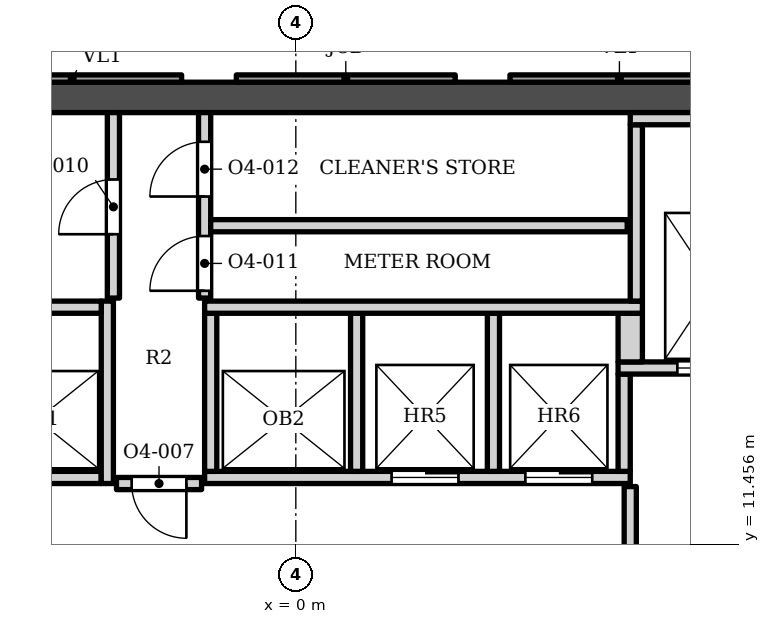
"""IFC4 building model, lengths in metres.
Left out: names, types, materials, properties, quantities, classifications, styles, units other than length and angle.
Written with IfcOpenShell. Run it as: python <this file> out.ifc"""

import sys

from ifc_helpers import new_model, si_unit, direction, frame, frame_2d, origin, place, context, subcontext, project, spatial, polyline, rectangle, outline, extrude, element, fill, save


model = new_model("IFC4")
c1 = context("Model", 3, precision=1e-05, world=origin(), true_north=direction((0.0, 1.0)))
c2 = subcontext(c1, "Body", "Model", "MODEL_VIEW")
j1 = project(units=[si_unit("LENGTHUNIT", "METRE"), si_unit("PLANEANGLEUNIT", "RADIAN")], contexts=[c1])
p1 = place(None, origin())
s1 = spatial("IfcSite", under=j1, at=p1, CompositionType="ELEMENT")
p2 = place(p1, origin())
s2 = spatial("IfcBuilding", under=s1, at=p2, CompositionType="ELEMENT")
p3 = place(p2, frame((0.0, 0.0, 179.7)))
s3 = spatial("IfcBuildingStorey", under=s2, at=p3, CompositionType="ELEMENT", Elevation=179.7)
p4 = place(p3, frame((-15.1, 18.802, 0.0), z_axis=(0.0, 0.0, 1.0), x_axis=(1.0, 0.0, 0.0)))
e1 = element("IfcWall", 1, at=p4, inside=s3, PredefinedType="SHEAR", context=c2, shape_type="SweptSolid", body=[
    extrude(rectangle(XDim=30.2, YDim=0.5, at=frame_2d((15.1, 0.0))), origin(), (0.0, 0.0, 1.0), 3.9),
])
p5 = place(p3, origin())
e2 = element("IfcWall", 2, at=p5, inside=s3, PredefinedType="ELEMENTEDWALL", context=c2, shape_type="SweptSolid", body=[
    extrude(outline(polyline([(3.522, 19.173), (3.522, 19.052), (7.122, 19.052), (7.122, 19.173), (3.522, 19.173)])), origin(), (0.0, 0.0, 1.0), 3.0),
])
p6 = place(p3, origin())
e3 = element("IfcWall", 3, at=p6, inside=s3, PredefinedType="SOLIDWALL", context=c2, shape_type="SweptSolid", body=[
    extrude(outline(polyline([(-0.978, 19.173), (-0.978, 19.052), (2.622, 19.052), (2.622, 19.173), (-0.978, 19.173)])), origin(), (0.0, 0.0, 1.0), 3.0),
])
p7 = place(p3, origin())
e4 = element("IfcWall", 4, at=p7, inside=s3, PredefinedType="ELEMENTEDWALL", context=c2, shape_type="SweptSolid", body=[
    extrude(outline(polyline([(-5.478, 19.173), (-5.478, 19.052), (-1.878, 19.052), (-1.878, 19.173), (-5.478, 19.173)])), origin(), (0.0, 0.0, 1.0), 3.0),
])
p8 = place(p3, frame((5.5, 9.103, 0.0), z_axis=(0.0, 0.0, 1.0), x_axis=(0.0, 1.0, 0.0)))
e5 = element("IfcWall", 5, at=p8, inside=s3, PredefinedType="SOLIDWALL", context=c2, shape_type="SweptSolid", body=[
    extrude(rectangle(XDim=3.3, YDim=0.2, at=frame_2d((1.65, 0.0))), origin(), (0.0, 0.0, 1.0), 3.73),
])
p9 = place(p8, frame((0.85, 0.0, 0.0)))
e6 = element("IfcOpeningElement", 6, at=p9, cuts=e5, PredefinedType="OPENING", context=c2, shape_type="SweptSolid", body=[
    extrude(rectangle(XDim=1.4, YDim=2.1, at=frame_2d((0.7, 1.05))), frame((0.0, 0.11, 0.0), z_axis=(0.0, -1.0, 0.0), x_axis=(1.0, 0.0, 0.0)), (0.0, 0.0, 1.0), 0.22),
])
p10 = place(p3, frame((-2.95, 12.453, 0.0), z_axis=(0.0, 0.0, 1.0), x_axis=(1.0, 0.0, 0.0)))
e7 = element("IfcWall", 7, at=p10, inside=s3, PredefinedType="SOLIDWALL", context=c2, shape_type="SweptSolid", body=[
    extrude(rectangle(XDim=1.4, YDim=0.2, at=frame_2d((0.7, 0.0))), origin(), (0.0, 0.0, 1.0), 3.73),
])
p11 = place(p10, frame((0.25, 0.0, 0.0)))
e8 = element("IfcOpeningElement", 8, at=p11, cuts=e7, PredefinedType="OPENING", context=c2, shape_type="SweptSolid", body=[
    extrude(rectangle(XDim=0.9, YDim=2.1, at=frame_2d((0.45, 1.05))), frame((0.0, 0.11, 0.0), z_axis=(0.0, -1.0, 0.0), x_axis=(1.0, 0.0, 0.0)), (0.0, 0.0, 1.0), 0.22),
])
p12 = place(p3, frame((-5.3, 12.552, 0.0), z_axis=(0.0, 0.0, 1.0), x_axis=(1.0, 0.0, 0.0)))
e9 = element("IfcWall", 9, at=p12, inside=s3, PredefinedType="SOLIDWALL", context=c2, shape_type="SweptSolid", body=[
    extrude(rectangle(XDim=2.1, YDim=0.2, at=frame_2d((1.05, 0.0))), origin(), (0.0, 0.0, 1.0), 3.73),
])
p13 = place(p3, frame((-3.1, 12.453, 0.0), z_axis=(0.0, 0.0, 1.0), x_axis=(0.0, 1.0, 0.0)))
e10 = element("IfcWall", 10, at=p13, inside=s3, PredefinedType="SOLIDWALL", context=c2, shape_type="SweptSolid", body=[
    extrude(rectangle(XDim=3.0, YDim=0.2, at=frame_2d((1.5, 0.0))), origin(), (0.0, 0.0, 1.0), 3.73),
])
p14 = place(p3, frame((-1.5, 12.552, 0.0), z_axis=(0.0, 0.0, 1.0), x_axis=(1.0, 0.0, 0.0)))
e11 = element("IfcWall", 11, at=p14, inside=s3, PredefinedType="SOLIDWALL", context=c2, shape_type="SweptSolid", body=[
    extrude(rectangle(XDim=7.0, YDim=0.2, at=frame_2d((3.5, 0.0))), origin(), (0.0, 0.0, 1.0), 3.73),
])
p15 = place(p14, frame((3.075, 0.0, 0.0)))
e12 = element("IfcOpeningElement", 12, at=p15, cuts=e11, PredefinedType="OPENING", context=c2, shape_type="SweptSolid", body=[
    extrude(rectangle(XDim=1.1, YDim=2.1, at=frame_2d((0.55, 1.05))), frame((0.0, 0.11, 0.0), z_axis=(0.0, -1.0, 0.0), x_axis=(1.0, 0.0, 0.0)), (0.0, 0.0, 1.0), 0.22),
])
p16 = place(p14, frame((5.275, 0.0, 0.0)))
e13 = element("IfcOpeningElement", 13, at=p16, cuts=e11, PredefinedType="OPENING", context=c2, shape_type="SweptSolid", body=[
    extrude(rectangle(XDim=1.1, YDim=2.1, at=frame_2d((0.55, 1.05))), frame((0.0, 0.11, 0.0), z_axis=(0.0, -1.0, 0.0), x_axis=(1.0, 0.0, 0.0)), (0.0, 0.0, 1.0), 0.22),
])
for number, where, z_axis, x_axis in (
    (14, (-1.4, 12.653, 0.0), (0.0, 0.0, 1.0), (0.0, 1.0, 0.0)),
    (15, (1.0, 12.653, 0.0), (0.0, 0.0, 1.0), (0.0, 1.0, 0.0)),
    (16, (3.25, 12.653, 0.0), (0.0, 0.0, 1.0), (0.0, 1.0, 0.0)),
):
    element("IfcWall", number, at=place(p3, frame(where, z_axis=z_axis, x_axis=x_axis)), inside=s3, PredefinedType="SOLIDWALL", context=c2, shape_type="SweptSolid", body=[
        extrude(rectangle(XDim=2.6, YDim=0.2, at=frame_2d((1.3, 0.0))), origin(), (0.0, 0.0, 1.0), 3.73),
    ])
p17 = place(p3, frame((5.4, 12.653, 0.0), z_axis=(0.0, 0.0, 1.0), x_axis=(0.0, 1.0, 0.0)))
e17 = element("IfcWall", 17, at=p17, inside=s3, PredefinedType="SOLIDWALL", context=c2, shape_type="SweptSolid", body=[
    extrude(rectangle(XDim=1.6, YDim=0.2, at=frame_2d((0.8, 0.0))), origin(), (0.0, 0.0, 1.0), 3.73),
])
p18 = place(p3, frame((5.3, 14.353, 0.0), z_axis=(0.0, 0.0, 1.0), x_axis=(1.0, 0.0, 0.0)))
e18 = element("IfcWall", 18, at=p18, inside=s3, PredefinedType="SOLIDWALL", context=c2, shape_type="SweptSolid", body=[
    extrude(rectangle(XDim=2.75, YDim=0.2, at=frame_2d((1.375, 0.0))), origin(), (0.0, 0.0, 1.0), 3.73),
])
p19 = place(p18, frame((0.975, 0.0, 0.0)))
e19 = element("IfcOpeningElement", 19, at=p19, cuts=e18, PredefinedType="OPENING", context=c2, shape_type="SweptSolid", body=[
    extrude(rectangle(XDim=1.2, YDim=2.1, at=frame_2d((0.6, 1.05))), frame((0.0, 0.11, 0.0), z_axis=(0.0, -1.0, 0.0), x_axis=(1.0, 0.0, 0.0)), (0.0, 0.0, 1.0), 0.22),
])
p20 = place(p3, frame((5.5, 14.453, 0.0), z_axis=(0.0, 0.0, 1.0), x_axis=(0.0, 1.0, 0.0)))
e20 = element("IfcWall", 20, at=p20, inside=s3, PredefinedType="SOLIDWALL", context=c2, shape_type="SweptSolid", body=[
    extrude(rectangle(XDim=0.8, YDim=0.4, at=frame_2d((0.4, 0.0))), origin(), (0.0, 0.0, 1.0), 3.73),
])
p21 = place(p3, frame((-5.3, 15.353, 0.0), z_axis=(0.0, 0.0, 1.0), x_axis=(1.0, 0.0, 0.0)))
e21 = element("IfcWall", 21, at=p21, inside=s3, PredefinedType="SOLIDWALL", context=c2, shape_type="SweptSolid", body=[
    extrude(rectangle(XDim=2.1, YDim=0.2, at=frame_2d((1.05, 0.0))), origin(), (0.0, 0.0, 1.0), 3.73),
])
p22 = place(p3, frame((-1.5, 15.353, 0.0), z_axis=(0.0, 0.0, 1.0), x_axis=(1.0, 0.0, 0.0)))
e22 = element("IfcWall", 22, at=p22, inside=s3, PredefinedType="SOLIDWALL", context=c2, shape_type="SweptSolid", body=[
    extrude(rectangle(XDim=7.2, YDim=0.2, at=frame_2d((3.6, 0.0))), origin(), (0.0, 0.0, 1.0), 3.73),
])
p23 = place(p3, frame((5.6, 15.453, 0.0), z_axis=(0.0, 0.0, 1.0), x_axis=(0.0, 1.0, 0.0)))
e23 = element("IfcWall", 23, at=p23, inside=s3, PredefinedType="SOLIDWALL", context=c2, shape_type="SweptSolid", body=[
    extrude(rectangle(XDim=2.9, YDim=0.2, at=frame_2d((1.45, 0.0))), origin(), (0.0, 0.0, 1.0), 3.73),
])
p24 = place(p3, frame((-3.0, 15.503, 0.0), z_axis=(0.0, 0.0, 1.0), x_axis=(0.0, 1.0, 0.0)))
e24 = element("IfcWall", 24, at=p24, inside=s3, PredefinedType="SOLIDWALL", context=c2, shape_type="SweptSolid", body=[
    extrude(rectangle(XDim=3.05, YDim=0.2, at=frame_2d((1.525, 0.0))), origin(), (0.0, 0.0, 1.0), 3.73),
])
p25 = place(p24, frame((1.05, 0.0, 0.0)))
e25 = element("IfcOpeningElement", 25, at=p25, cuts=e24, PredefinedType="OPENING", context=c2, shape_type="SweptSolid", body=[
    extrude(rectangle(XDim=0.9, YDim=2.1, at=frame_2d((0.45, 1.05))), frame((0.0, 0.11, 0.0), z_axis=(0.0, -1.0, 0.0), x_axis=(1.0, 0.0, 0.0)), (0.0, 0.0, 1.0), 0.22),
])
p26 = place(p3, frame((-1.5, 15.503, 0.0), z_axis=(0.0, 0.0, 1.0), x_axis=(0.0, 1.0, 0.0)))
e26 = element("IfcWall", 26, at=p26, inside=s3, PredefinedType="SOLIDWALL", context=c2, shape_type="SweptSolid", body=[
    extrude(rectangle(XDim=3.05, YDim=0.2, at=frame_2d((1.525, 0.0))), origin(), (0.0, 0.0, 1.0), 3.73),
])
p27 = place(p26, frame((0.12, 0.0, 0.0)))
e27 = element("IfcOpeningElement", 27, at=p27, cuts=e26, PredefinedType="OPENING", context=c2, shape_type="SweptSolid", body=[
    extrude(rectangle(XDim=0.9, YDim=2.1, at=frame_2d((0.45, 1.05))), frame((0.0, 0.11, 0.0), z_axis=(0.0, -1.0, 0.0), x_axis=(1.0, 0.0, 0.0)), (0.0, 0.0, 1.0), 0.22),
])
p28 = place(p26, frame((1.67, 0.0, 0.0)))
e28 = element("IfcOpeningElement", 28, at=p28, cuts=e26, PredefinedType="OPENING", context=c2, shape_type="SweptSolid", body=[
    extrude(rectangle(XDim=0.9, YDim=2.1, at=frame_2d((0.45, 1.05))), frame((0.0, 0.11, 0.0), z_axis=(0.0, -1.0, 0.0), x_axis=(1.0, 0.0, 0.0)), (0.0, 0.0, 1.0), 0.22),
])
p29 = place(p3, frame((-1.4, 16.693, 0.0), z_axis=(0.0, 0.0, 1.0), x_axis=(1.0, 0.0, 0.0)))
e29 = element("IfcWall", 29, at=p29, inside=s3, PredefinedType="SOLIDWALL", context=c2, shape_type="SweptSolid", body=[
    extrude(rectangle(XDim=6.85, YDim=0.2, at=frame_2d((3.425, 0.0))), origin(), (0.0, 0.0, 1.0), 3.73),
])
p30 = place(p3, frame((5.5, 18.453, 0.0), z_axis=(0.0, 0.0, 1.0), x_axis=(1.0, 0.0, 0.0)))
e30 = element("IfcWall", 30, at=p30, inside=s3, PredefinedType="SOLIDWALL", context=c2, shape_type="SweptSolid", body=[
    extrude(rectangle(XDim=2.55, YDim=0.2, at=frame_2d((1.275, 0.0))), origin(), (0.0, 0.0, 1.0), 3.73),
])
p31 = place(p15, origin())
e31 = element("IfcDoor", 31, at=p31, inside=s3, OperationType="DOUBLE_DOOR_SLIDING", PredefinedType="DOOR", context=c2, shape_type="SweptSolid", body=[
    extrude(rectangle(XDim=1.1, YDim=2.1, at=frame_2d((0.55, 1.05))), frame((0.0, 0.025, 0.0), z_axis=(0.0, -1.0, 0.0), x_axis=(1.0, 0.0, 0.0)), (0.0, 0.0, 1.0), 0.05),
])
fill(e12, e31)
p32 = place(p16, origin())
e32 = element("IfcDoor", 32, at=p32, inside=s3, OperationType="DOUBLE_DOOR_SLIDING", PredefinedType="DOOR", context=c2, shape_type="SweptSolid", body=[
    extrude(rectangle(XDim=1.1, YDim=2.1, at=frame_2d((0.55, 1.05))), frame((0.0, 0.025, 0.0), z_axis=(0.0, -1.0, 0.0), x_axis=(1.0, 0.0, 0.0)), (0.0, 0.0, 1.0), 0.05),
])
fill(e13, e32)
p33 = place(p19, origin())
e33 = element("IfcDoor", 33, at=p33, inside=s3, OperationType="DOUBLE_DOOR_SLIDING", PredefinedType="DOOR", context=c2, shape_type="SweptSolid", body=[
    extrude(rectangle(XDim=1.2, YDim=2.1, at=frame_2d((0.6, 1.05))), frame((0.0, 0.025, 0.0), z_axis=(0.0, -1.0, 0.0), x_axis=(1.0, 0.0, 0.0)), (0.0, 0.0, 1.0), 0.05),
])
fill(e19, e33)
p34 = place(p11, origin())
e34 = element("IfcDoor", 34, at=p34, inside=s3, OperationType="SINGLE_SWING_RIGHT", PredefinedType="DOOR", context=c2, shape_type="SweptSolid", body=[
    extrude(rectangle(XDim=0.9, YDim=2.1, at=frame_2d((0.45, 1.05))), frame((0.0, 0.025, 0.0), z_axis=(0.0, -1.0, 0.0), x_axis=(1.0, 0.0, 0.0)), (0.0, 0.0, 1.0), 0.05),
])
fill(e8, e34)
p35 = place(p25, origin())
e35 = element("IfcDoor", 35, at=p35, inside=s3, OperationType="SINGLE_SWING_LEFT", PredefinedType="DOOR", context=c2, shape_type="SweptSolid", body=[
    extrude(rectangle(XDim=0.9, YDim=2.1, at=frame_2d((0.45, 1.05))), frame((0.0, 0.025, 0.0), z_axis=(0.0, -1.0, 0.0), x_axis=(1.0, 0.0, 0.0)), (0.0, 0.0, 1.0), 0.05),
])
fill(e25, e35)
p36 = place(p27, origin())
e36 = element("IfcDoor", 36, at=p36, inside=s3, OperationType="SINGLE_SWING_LEFT", PredefinedType="DOOR", context=c2, shape_type="SweptSolid", body=[
    extrude(rectangle(XDim=0.9, YDim=2.1, at=frame_2d((0.45, 1.05))), frame((0.0, 0.025, 0.0), z_axis=(0.0, -1.0, 0.0), x_axis=(1.0, 0.0, 0.0)), (0.0, 0.0, 1.0), 0.05),
])
fill(e27, e36)
p37 = place(p28, origin())
e37 = element("IfcDoor", 37, at=p37, inside=s3, OperationType="SINGLE_SWING_LEFT", PredefinedType="DOOR", context=c2, shape_type="SweptSolid", body=[
    extrude(rectangle(XDim=0.9, YDim=2.1, at=frame_2d((0.45, 1.05))), frame((0.0, 0.025, 0.0), z_axis=(0.0, -1.0, 0.0), x_axis=(1.0, 0.0, 0.0)), (0.0, 0.0, 1.0), 0.05),
])
fill(e28, e37)
save(model, sys.argv[1])
